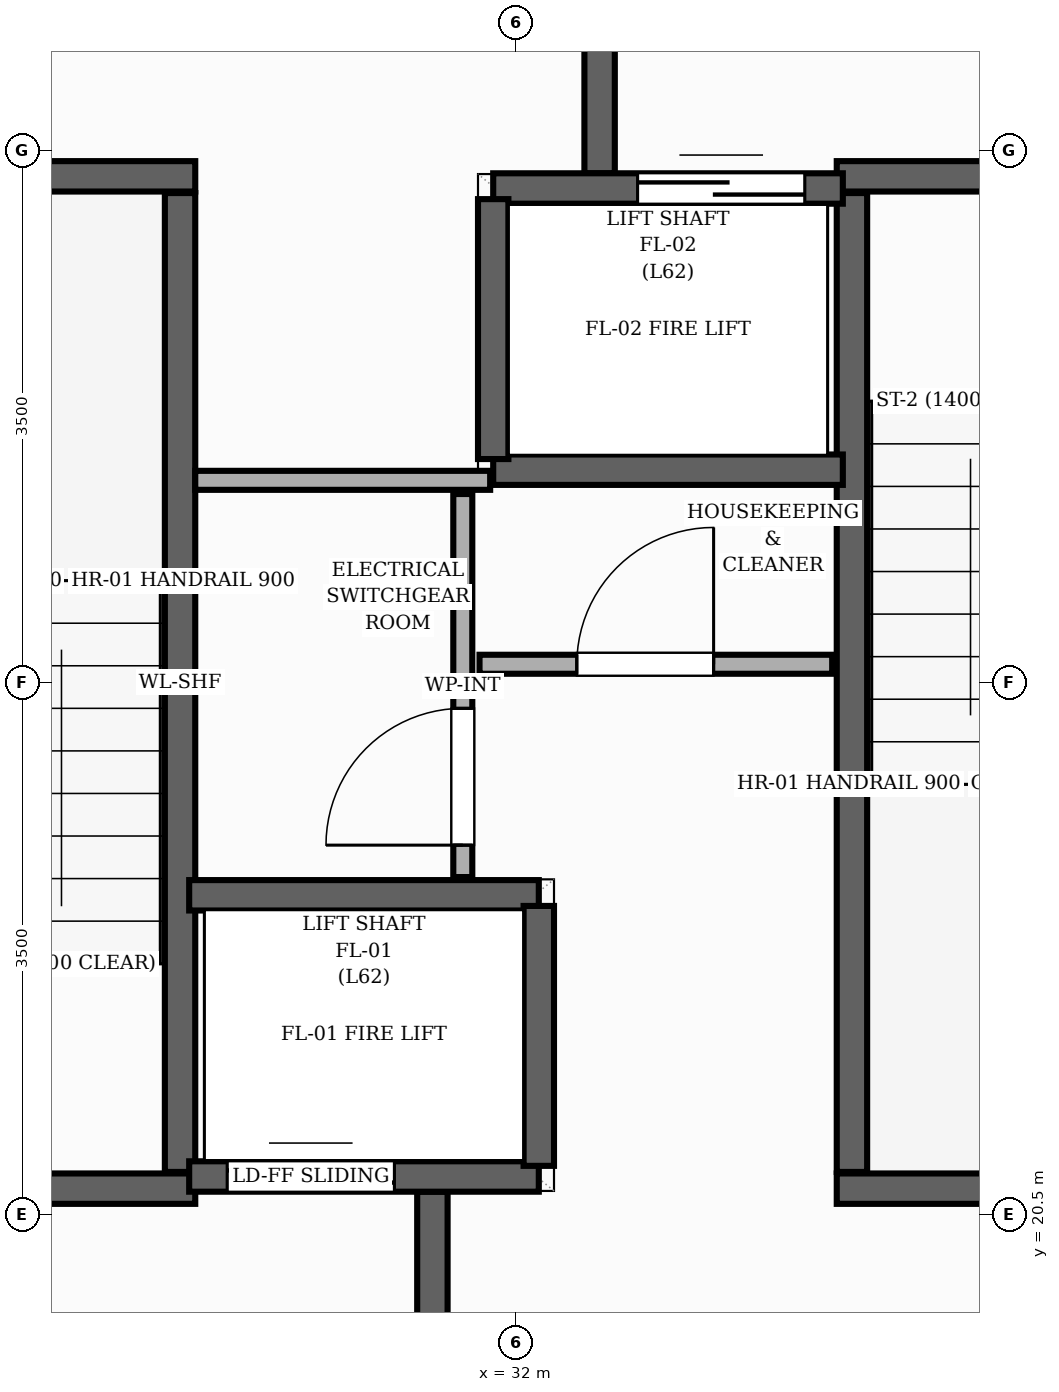
"""IFC4 building model, lengths in metres.
Left out: names, types, materials, properties, quantities, classifications, styles, units other than length and angle.
Written with IfcOpenShell. Run it as: python <this file> out.ifc"""

import sys

from ifc_helpers import new_model, si_unit, direction, frame, frame_2d, origin, place, context, subcontext, project, spatial, rectangle, extrude, element, fill, save


model = new_model("IFC4")
c1 = context("Model", 3, precision=1e-05, world=origin(), true_north=direction((0.0, 1.0)))
c2 = subcontext(c1, "Body", "Model", "MODEL_VIEW")
j1 = project(units=[si_unit("LENGTHUNIT", "METRE"), si_unit("PLANEANGLEUNIT", "RADIAN")], contexts=[c1])
p1 = place(None, origin())
s1 = spatial("IfcSite", under=j1, at=p1, CompositionType="ELEMENT")
p2 = place(p1, origin())
s2 = spatial("IfcBuilding", under=s1, at=p2, CompositionType="ELEMENT")
p3 = place(p2, frame((0.0, 0.0, 207.84)))
s3 = spatial("IfcBuildingStorey", under=s2, at=p3, CompositionType="ELEMENT", Elevation=207.84)
p4 = place(p3, frame((29.79, 20.78, 0.0), z_axis=(0.0, 0.0, 1.0), x_axis=(0.0, 1.0, 0.0)))
e1 = element("IfcWall", 1, at=p4, inside=s3, PredefinedType="SHEAR", context=c2, shape_type="SweptSolid", body=[
    extrude(rectangle(XDim=6.44, YDim=0.2, at=frame_2d((3.22, 0.0))), origin(), (0.0, 0.0, 1.0), 3.2),
])
p5 = place(p3, frame((26.65, 27.33, 0.0), z_axis=(0.0, 0.0, 1.0), x_axis=(1.0, 0.0, 0.0)))
e2 = element("IfcWall", 2, at=p5, inside=s3, PredefinedType="SHEAR", context=c2, shape_type="SweptSolid", body=[
    extrude(rectangle(XDim=3.24, YDim=0.2, at=frame_2d((1.62, 0.0))), origin(), (0.0, 0.0, 1.0), 3.2),
])
p6 = place(p3, frame((26.65, 20.67, 0.0), z_axis=(0.0, 0.0, 1.0), x_axis=(1.0, 0.0, 0.0)))
e3 = element("IfcWall", 3, at=p6, inside=s3, PredefinedType="SHEAR", context=c2, shape_type="SweptSolid", body=[
    extrude(rectangle(XDim=3.24, YDim=0.2, at=frame_2d((1.62, 0.0))), origin(), (0.0, 0.0, 1.0), 3.2),
])
p7 = place(p6, frame((1.055, 0.0, 0.0)))
e4 = element("IfcOpeningElement", 4, at=p7, cuts=e3, PredefinedType="OPENING", context=c2, shape_type="SweptSolid", body=[
    extrude(rectangle(XDim=1.05, YDim=2.15, at=frame_2d((0.525, 1.075))), frame((0.0, 0.11, 0.0), z_axis=(0.0, -1.0, 0.0), x_axis=(1.0, 0.0, 0.0)), (0.0, 0.0, 1.0), 0.22),
])
p8 = place(p3, frame((34.21, 20.78, 0.0), z_axis=(0.0, 0.0, 1.0), x_axis=(0.0, 1.0, 0.0)))
e5 = element("IfcWall", 5, at=p8, inside=s3, PredefinedType="SHEAR", context=c2, shape_type="SweptSolid", body=[
    extrude(rectangle(XDim=6.44, YDim=0.2, at=frame_2d((3.22, 0.0))), origin(), (0.0, 0.0, 1.0), 3.2),
])
p9 = place(p3, frame((34.11, 20.67, 0.0), z_axis=(0.0, 0.0, 1.0), x_axis=(1.0, 0.0, 0.0)))
e6 = element("IfcWall", 6, at=p9, inside=s3, PredefinedType="SHEAR", context=c2, shape_type="SweptSolid", body=[
    extrude(rectangle(XDim=3.24, YDim=0.2, at=frame_2d((1.62, 0.0))), origin(), (0.0, 0.0, 1.0), 3.2),
])
p10 = place(p3, frame((34.11, 27.33, 0.0), z_axis=(0.0, 0.0, 1.0), x_axis=(1.0, 0.0, 0.0)))
e7 = element("IfcWall", 7, at=p10, inside=s3, PredefinedType="SHEAR", context=c2, shape_type="SweptSolid", body=[
    extrude(rectangle(XDim=3.24, YDim=0.2, at=frame_2d((1.62, 0.0))), origin(), (0.0, 0.0, 1.0), 3.2),
])
p11 = place(p10, frame((1.135, 0.0, 0.0)))
e8 = element("IfcOpeningElement", 8, at=p11, cuts=e7, PredefinedType="OPENING", context=c2, shape_type="SweptSolid", body=[
    extrude(rectangle(XDim=1.05, YDim=2.15, at=frame_2d((0.525, 1.075))), frame((0.0, 0.11, 0.0), z_axis=(0.0, -1.0, 0.0), x_axis=(1.0, 0.0, 0.0)), (0.0, 0.0, 1.0), 0.22),
])
for number, where, z_axis, x_axis in (
    (9, (31.45, 17.15, 0.0), (0.0, 0.0, 1.0), (0.0, 1.0, 0.0)),
    (10, (32.55, 27.35, 0.0), (0.0, 0.0, 1.0), (0.0, 1.0, 0.0)),
):
    element("IfcWall", number, at=place(p3, frame(where, z_axis=z_axis, x_axis=x_axis)), inside=s3, PredefinedType="SHEAR", context=c2, shape_type="SweptSolid", body=[
        extrude(rectangle(XDim=3.5, YDim=0.2, at=frame_2d((1.75, 0.0))), origin(), (0.0, 0.0, 1.0), 3.2),
    ])
p12 = place(p3, frame((29.85, 20.75, 0.0), z_axis=(0.0, 0.0, 1.0), x_axis=(1.0, 0.0, 0.0)))
e11 = element("IfcWall", 11, at=p12, inside=s3, PredefinedType="SHEAR", context=c2, shape_type="SweptSolid", body=[
    extrude(rectangle(XDim=2.3, YDim=0.2, at=frame_2d((1.15, 0.0))), origin(), (0.0, 0.0, 1.0), 3.2),
])
p13 = place(p12, frame((0.25, 0.0, 0.0)))
e12 = element("IfcOpeningElement", 12, at=p13, cuts=e11, PredefinedType="OPENING", context=c2, shape_type="SweptSolid", body=[
    extrude(rectangle(XDim=1.1, YDim=2.15, at=frame_2d((0.55, 1.075))), frame((0.0, 0.11, 0.0), z_axis=(0.0, -1.0, 0.0), x_axis=(1.0, 0.0, 0.0)), (0.0, 0.0, 1.0), 0.22),
])
p14 = place(p3, frame((29.85, 22.6, 0.0), z_axis=(0.0, 0.0, 1.0), x_axis=(1.0, 0.0, 0.0)))
e13 = element("IfcWall", 13, at=p14, inside=s3, PredefinedType="SHEAR", context=c2, shape_type="SweptSolid", body=[
    extrude(rectangle(XDim=2.3, YDim=0.2, at=frame_2d((1.15, 0.0))), origin(), (0.0, 0.0, 1.0), 3.2),
])
p15 = place(p3, frame((32.15, 20.82, 0.0), z_axis=(0.0, 0.0, 1.0), x_axis=(0.0, 1.0, 0.0)))
e14 = element("IfcWall", 14, at=p15, inside=s3, PredefinedType="SHEAR", context=c2, shape_type="SweptSolid", body=[
    extrude(rectangle(XDim=1.71, YDim=0.2, at=frame_2d((0.855, 0.0))), origin(), (0.0, 0.0, 1.0), 3.2),
])
p16 = place(p3, frame((31.85, 27.25, 0.0), z_axis=(0.0, 0.0, 1.0), x_axis=(1.0, 0.0, 0.0)))
e15 = element("IfcWall", 15, at=p16, inside=s3, PredefinedType="SHEAR", context=c2, shape_type="SweptSolid", body=[
    extrude(rectangle(XDim=2.3, YDim=0.2, at=frame_2d((1.15, 0.0))), origin(), (0.0, 0.0, 1.0), 3.2),
])
p17 = place(p16, frame((0.95, 0.0, 0.0)))
e16 = element("IfcOpeningElement", 16, at=p17, cuts=e15, PredefinedType="OPENING", context=c2, shape_type="SweptSolid", body=[
    extrude(rectangle(XDim=1.1, YDim=2.15, at=frame_2d((0.55, 1.075))), frame((0.0, 0.11, 0.0), z_axis=(0.0, -1.0, 0.0), x_axis=(1.0, 0.0, 0.0)), (0.0, 0.0, 1.0), 0.22),
])
p18 = place(p3, frame((31.85, 25.4, 0.0), z_axis=(0.0, 0.0, 1.0), x_axis=(1.0, 0.0, 0.0)))
e17 = element("IfcWall", 17, at=p18, inside=s3, PredefinedType="SHEAR", context=c2, shape_type="SweptSolid", body=[
    extrude(rectangle(XDim=2.3, YDim=0.2, at=frame_2d((1.15, 0.0))), origin(), (0.0, 0.0, 1.0), 3.2),
])
p19 = place(p3, frame((31.85, 25.47, 0.0), z_axis=(0.0, 0.0, 1.0), x_axis=(0.0, 1.0, 0.0)))
e18 = element("IfcWall", 18, at=p19, inside=s3, PredefinedType="SHEAR", context=c2, shape_type="SweptSolid", body=[
    extrude(rectangle(XDim=1.71, YDim=0.2, at=frame_2d((0.855, 0.0))), origin(), (0.0, 0.0, 1.0), 3.2),
])
p20 = place(p3, frame((31.65, 22.72, 0.0), z_axis=(0.0, 0.0, 1.0), x_axis=(0.0, 1.0, 0.0)))
e19 = element("IfcWall", 19, at=p20, inside=s3, PredefinedType="PARTITIONING", context=c2, shape_type="SweptSolid", body=[
    extrude(rectangle(XDim=2.52, YDim=0.125, at=frame_2d((1.26, 0.0))), origin(), (0.0, 0.0, 1.0), 2.955),
])
p21 = place(p20, frame((0.21, 0.0, 0.0)))
e20 = element("IfcOpeningElement", 20, at=p21, cuts=e19, PredefinedType="OPENING", context=c2, shape_type="SweptSolid", body=[
    extrude(rectangle(XDim=0.9, YDim=2.1, at=frame_2d((0.45, 1.05))), frame((0.0, 0.073, 0.0), z_axis=(0.0, -1.0, 0.0), x_axis=(1.0, 0.0, 0.0)), (0.0, 0.0, 1.0), 0.145),
])
p22 = place(p3, frame((31.76, 24.12, 0.0), z_axis=(0.0, 0.0, 1.0), x_axis=(1.0, 0.0, 0.0)))
e21 = element("IfcWall", 21, at=p22, inside=s3, PredefinedType="PARTITIONING", context=c2, shape_type="SweptSolid", body=[
    extrude(rectangle(XDim=2.32, YDim=0.125, at=frame_2d((1.16, 0.0))), origin(), (0.0, 0.0, 1.0), 2.955),
])
p23 = place(p22, frame((0.64, 0.0, 0.0)))
e22 = element("IfcOpeningElement", 22, at=p23, cuts=e21, PredefinedType="OPENING", context=c2, shape_type="SweptSolid", body=[
    extrude(rectangle(XDim=0.9, YDim=2.1, at=frame_2d((0.45, 1.05))), frame((0.0, 0.073, 0.0), z_axis=(0.0, -1.0, 0.0), x_axis=(1.0, 0.0, 0.0)), (0.0, 0.0, 1.0), 0.145),
])
p24 = place(p3, frame((29.89, 25.33, 0.0), z_axis=(0.0, 0.0, 1.0), x_axis=(1.0, 0.0, 0.0)))
e23 = element("IfcWall", 23, at=p24, inside=s3, PredefinedType="PARTITIONING", context=c2, shape_type="SweptSolid", body=[
    extrude(rectangle(XDim=1.94, YDim=0.125, at=frame_2d((0.97, 0.0))), origin(), (0.0, 0.0, 1.0), 2.955),
])
p25 = place(p13, origin())
e24 = element("IfcDoor", 24, at=p25, inside=s3, OperationType="DOUBLE_DOOR_SLIDING", PredefinedType="DOOR", context=c2, shape_type="SweptSolid", body=[
    extrude(rectangle(XDim=1.1, YDim=2.15, at=frame_2d((0.55, 1.075))), frame((0.0, 0.025, 0.0), z_axis=(0.0, -1.0, 0.0), x_axis=(1.0, 0.0, 0.0)), (0.0, 0.0, 1.0), 0.05),
])
fill(e12, e24)
p26 = place(p17, origin())
e25 = element("IfcDoor", 25, at=p26, inside=s3, OperationType="DOUBLE_DOOR_SLIDING", PredefinedType="DOOR", context=c2, shape_type="SweptSolid", body=[
    extrude(rectangle(XDim=1.1, YDim=2.15, at=frame_2d((0.55, 1.075))), frame((0.0, 0.025, 0.0), z_axis=(0.0, -1.0, 0.0), x_axis=(1.0, 0.0, 0.0)), (0.0, 0.0, 1.0), 0.05),
])
fill(e16, e25)
p27 = place(p21, origin())
e26 = element("IfcDoor", 26, at=p27, inside=s3, OperationType="SINGLE_SWING_LEFT", PredefinedType="DOOR", context=c2, shape_type="SweptSolid", body=[
    extrude(rectangle(XDim=0.9, YDim=2.1, at=frame_2d((0.45, 1.05))), frame((0.0, 0.025, 0.0), z_axis=(0.0, -1.0, 0.0), x_axis=(1.0, 0.0, 0.0)), (0.0, 0.0, 1.0), 0.05),
])
fill(e20, e26)
p28 = place(p23, origin())
e27 = element("IfcDoor", 27, at=p28, inside=s3, OperationType="SINGLE_SWING_RIGHT", PredefinedType="DOOR", context=c2, shape_type="SweptSolid", body=[
    extrude(rectangle(XDim=0.9, YDim=2.1, at=frame_2d((0.45, 1.05))), frame((0.0, 0.025, 0.0), z_axis=(0.0, -1.0, 0.0), x_axis=(1.0, 0.0, 0.0)), (0.0, 0.0, 1.0), 0.05),
])
fill(e22, e27)
save(model, sys.argv[1])
